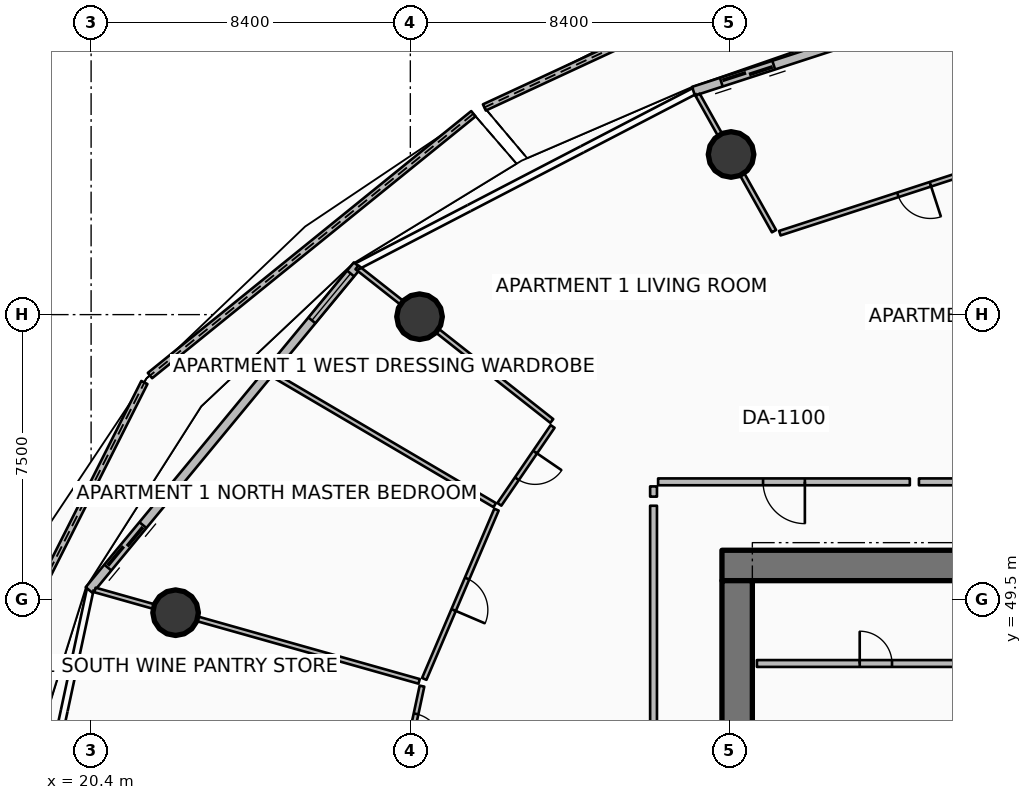
"""IFC4 building model, lengths in metres.
Left out: names, types, materials, properties, quantities, classifications, styles, units other than length and angle.
Written with IfcOpenShell. Run it as: python <this file> out.ifc"""

import sys

from ifc_helpers import new_model, si_unit, direction, frame, frame_2d, origin, origin_2d, place, context, subcontext, project, spatial, polyline, rectangle, circle, outline, extrude, element, fill, save


model = new_model("IFC4")
c1 = context("Model", 3, precision=1e-05, world=origin(), true_north=direction((0.0, 1.0)))
c2 = subcontext(c1, "Body", "Model", "MODEL_VIEW")
j1 = project(units=[si_unit("LENGTHUNIT", "METRE"), si_unit("PLANEANGLEUNIT", "RADIAN")], contexts=[c1])
p1 = place(None, origin())
s1 = spatial("IfcSite", under=j1, at=p1, CompositionType="ELEMENT")
p2 = place(p1, origin())
s2 = spatial("IfcBuilding", under=s1, at=p2, CompositionType="ELEMENT")
p3 = place(p2, frame((0.0, 0.0, 93.9)))
s3 = spatial("IfcBuildingStorey", under=s2, at=p3, CompositionType="ELEMENT", Elevation=93.9)
p4 = place(p3, frame((37.0, 50.4, 0.0), z_axis=(0.0, 0.0, 1.0), x_axis=(1.0, 0.0, 0.0)))
e1 = element("IfcWall", 1, at=p4, inside=s3, PredefinedType="SHEAR", context=c2, shape_type="SweptSolid", body=[
    extrude(rectangle(XDim=9.9, YDim=0.8, at=frame_2d((4.95, 0.0))), origin(), (0.0, 0.0, 1.0), 3.75),
])
p5 = place(p3, frame((37.4, 34.0, 0.0), z_axis=(0.0, 0.0, 1.0), x_axis=(0.0, 1.0, 0.0)))
e2 = element("IfcWall", 2, at=p5, inside=s3, PredefinedType="SHEAR", context=c2, shape_type="SweptSolid", body=[
    extrude(rectangle(XDim=16.0, YDim=0.8, at=frame_2d((8.0, 0.0))), origin(), (0.0, 0.0, 1.0), 3.75),
])
for number, where, z_axis, x_axis in (
    (3, (37.24, 61.214, 0.0), (0.0, 0.0, 1.0), (1.0, 0.0, 0.0)),
    (4, (29.042, 56.945, 0.0), (0.0, 0.0, 1.0), (1.0, 0.0, 0.0)),
    (5, (22.623, 49.157, 0.0), (0.0, 0.0, 1.0), (1.0, 0.0, 0.0)),
):
    element("IfcColumn", number, at=place(p3, frame(where, z_axis=z_axis, x_axis=x_axis)), inside=s3, PredefinedType="COLUMN", context=c2, shape_type="SweptSolid", body=[
        extrude(circle(Radius=0.6, at=origin_2d()), origin(), (0.0, 0.0, 1.0), 3.5),
    ])
p6 = place(p3, frame((39.856, 66.678, 0.0), z_axis=(0.0, 0.0, 1.0), x_axis=(-0.907065674135, -0.420989148086, 0.0)))
e6 = element("IfcWall", 6, at=p6, inside=s3, PredefinedType="PARAPET", context=c2, shape_type="SweptSolid", body=[
    extrude(outline(polyline([(0.0, 0.0), (10.041, 0.0), (10.042, 1.233), (5.021, 1.418), (0.0, 1.632), (0.0, 0.0)])), frame((0.0, 0.09, 0.0), z_axis=(0.0, -1.0, 0.0), x_axis=(1.0, 0.0, 0.0)), (0.0, 0.0, 1.0), 0.18),
])
p7 = place(p3, frame((30.459, 62.285, 0.0), z_axis=(0.0, 0.0, 1.0), x_axis=(-0.777242274281, -0.629201436005, 0.0)))
e7 = element("IfcWall", 7, at=p7, inside=s3, PredefinedType="PARAPET", context=c2, shape_type="SweptSolid", body=[
    extrude(outline(polyline([(0.0, 0.0), (10.949, 0.0), (10.949, 1.148), (5.474, 1.127), (0.0, 1.224), (0.0, 0.0)])), frame((0.0, 0.09, 0.0), z_axis=(0.0, -1.0, 0.0), x_axis=(1.0, 0.0, 0.0)), (0.0, 0.0, 1.0), 0.18),
])
p8 = place(p3, frame((21.802, 55.214, 0.0), z_axis=(0.0, 0.0, 1.0), x_axis=(-0.450016241305, -0.893020370743, 0.0)))
e8 = element("IfcWall", 8, at=p8, inside=s3, PredefinedType="PARAPET", context=c2, shape_type="SweptSolid", body=[
    extrude(outline(polyline([(0.0, 0.0), (11.803, 0.0), (11.803, 1.483), (5.902, 1.284), (0.0, 1.148), (0.0, 0.0)])), frame((0.0, 0.09, 0.0), z_axis=(0.0, -1.0, 0.0), x_axis=(1.0, 0.0, 0.0)), (0.0, 0.0, 1.0), 0.18),
])
p9 = place(p3, frame((45.233, 65.797, 0.0), z_axis=(0.0, 0.0, 1.0), x_axis=(-0.951052494852, -0.30902937083, 0.0)))
e9 = element("IfcWall", 9, at=p9, inside=s3, PredefinedType="SOLIDWALL", context=c2, shape_type="SweptSolid", body=[
    extrude(rectangle(XDim=9.444, YDim=0.24, at=frame_2d((4.722, 0.0))), origin(), (0.0, 0.0, 1.0), 2.45),
])
p10 = place(p9, frame((7.224, 0.0, 0.0)))
e10 = element("IfcOpeningElement", 10, at=p10, cuts=e9, PredefinedType="OPENING", context=c2, shape_type="SweptSolid", body=[
    extrude(rectangle(XDim=1.45, YDim=2.15, at=frame_2d((0.725, 1.075))), frame((0.0, 0.13, 0.0), z_axis=(0.0, -1.0, 0.0), x_axis=(1.0, 0.0, 0.0)), (0.0, 0.0, 1.0), 0.26),
])
p11 = place(p9, frame((0.28, 0.0, 0.65)))
e11 = element("IfcOpeningElement", 11, at=p11, cuts=e9, PredefinedType="OPENING", context=c2, shape_type="SweptSolid", body=[
    extrude(rectangle(XDim=1.6, YDim=1.5, at=frame_2d((0.8, 0.75))), frame((0.0, 0.13, 0.0), z_axis=(0.0, -1.0, 0.0), x_axis=(1.0, 0.0, 0.0)), (0.0, 0.0, 1.0), 0.26),
])
p12 = place(p3, frame((27.407, 58.298, 0.0), z_axis=(0.0, 0.0, 1.0), x_axis=(-0.636704975, -0.771107498868, 0.0)))
e12 = element("IfcWall", 12, at=p12, inside=s3, PredefinedType="SOLIDWALL", context=c2, shape_type="SweptSolid", body=[
    extrude(rectangle(XDim=11.084, YDim=0.24, at=frame_2d((5.542, 0.0))), origin(), (0.0, 0.0, 1.0), 2.45),
])
p13 = place(p12, frame((8.864, 0.0, 0.0)))
e13 = element("IfcOpeningElement", 13, at=p13, cuts=e12, PredefinedType="OPENING", context=c2, shape_type="SweptSolid", body=[
    extrude(rectangle(XDim=1.45, YDim=2.15, at=frame_2d((0.725, 1.075))), frame((0.0, 0.13, 0.0), z_axis=(0.0, -1.0, 0.0), x_axis=(1.0, 0.0, 0.0)), (0.0, 0.0, 1.0), 0.26),
])
p14 = place(p12, frame((0.28, 0.0, 0.65)))
e14 = element("IfcOpeningElement", 14, at=p14, cuts=e12, PredefinedType="OPENING", context=c2, shape_type="SweptSolid", body=[
    extrude(rectangle(XDim=1.6, YDim=1.5, at=frame_2d((0.8, 0.75))), frame((0.0, 0.13, 0.0), z_axis=(0.0, -1.0, 0.0), x_axis=(1.0, 0.0, 0.0)), (0.0, 0.0, 1.0), 0.26),
])
p15 = place(p3, frame((37.92, 47.82, 0.0), z_axis=(0.0, 0.0, 1.0), x_axis=(1.0, 0.0, 0.0)))
e15 = element("IfcWall", 15, at=p15, inside=s3, PredefinedType="PARTITIONING", context=c2, shape_type="SweptSolid", body=[
    extrude(rectangle(XDim=6.26, YDim=0.18, at=frame_2d((3.13, 0.0))), origin(), (0.0, 0.0, 1.0), 3.5),
])
p16 = place(p15, frame((2.705, 0.0, 0.0)))
e16 = element("IfcOpeningElement", 16, at=p16, cuts=e15, PredefinedType="OPENING", context=c2, shape_type="SweptSolid", body=[
    extrude(rectangle(XDim=0.85, YDim=2.06, at=frame_2d((0.425, 1.03))), frame((0.0, 0.1, 0.0), z_axis=(0.0, -1.0, 0.0), x_axis=(1.0, 0.0, 0.0)), (0.0, 0.0, 1.0), 0.2),
])
p17 = place(p3, frame((41.944, 52.6, 0.0), z_axis=(0.0, 0.0, 1.0), x_axis=(-1.0, 0.0, 0.0)))
e17 = element("IfcWall", 17, at=p17, inside=s3, PredefinedType="PARTITIONING", context=c2, shape_type="SweptSolid", body=[
    extrude(rectangle(XDim=6.624, YDim=0.18, at=frame_2d((3.312, 0.0))), origin(), (0.0, 0.0, 1.0), 2.94),
])
p18 = place(p17, frame((2.762, 0.0, 0.0)))
e18 = element("IfcOpeningElement", 18, at=p18, cuts=e17, PredefinedType="OPENING", context=c2, shape_type="SweptSolid", body=[
    extrude(rectangle(XDim=1.1, YDim=2.1, at=frame_2d((0.55, 1.05))), frame((0.0, 0.1, 0.0), z_axis=(0.0, -1.0, 0.0), x_axis=(1.0, 0.0, 0.0)), (0.0, 0.0, 1.0), 0.2),
])
p19 = place(p3, frame((35.2, 52.48, 0.0), z_axis=(0.0, 0.0, 1.0), x_axis=(0.0, -1.0, 0.0)))
e19 = element("IfcWall", 19, at=p19, inside=s3, PredefinedType="PARTITIONING", context=c2, shape_type="SweptSolid", body=[
    extrude(rectangle(XDim=0.269, YDim=0.18, at=frame_2d((0.135, 0.0))), origin(), (0.0, 0.0, 1.0), 2.94),
])
p20 = place(p3, frame((46.625, 52.6, 0.0), z_axis=(0.0, 0.0, 1.0), x_axis=(-1.0, 0.0, 0.0)))
e20 = element("IfcWall", 20, at=p20, inside=s3, PredefinedType="PARTITIONING", context=c2, shape_type="SweptSolid", body=[
    extrude(rectangle(XDim=4.442, YDim=0.18, at=frame_2d((2.221, 0.0))), origin(), (0.0, 0.0, 1.0), 2.94),
])
p21 = place(p3, frame((38.37, 59.196, 0.0), z_axis=(0.0, 0.0, 1.0), x_axis=(-0.488603368932, 0.87250601595, 0.0)))
e21 = element("IfcWall", 21, at=p21, inside=s3, PredefinedType="PARTITIONING", context=c2, shape_type="SweptSolid", body=[
    extrude(rectangle(XDim=4.113, YDim=0.125, at=frame_2d((2.057, 0.0))), origin(), (0.0, 0.0, 1.0), 2.94),
])
p22 = place(p3, frame((45.591, 61.439, 0.0), z_axis=(0.0, 0.0, 1.0), x_axis=(-0.95105434732, -0.309023669714, 0.0)))
e22 = element("IfcWall", 22, at=p22, inside=s3, PredefinedType="PARTITIONING", context=c2, shape_type="SweptSolid", body=[
    extrude(rectangle(XDim=7.431, YDim=0.125, at=frame_2d((3.716, 0.0))), origin(), (0.0, 0.0, 1.0), 2.94),
])
p23 = place(p22, frame((3.265, 0.0, 0.0)))
e23 = element("IfcOpeningElement", 23, at=p23, cuts=e22, PredefinedType="OPENING", context=c2, shape_type="SweptSolid", body=[
    extrude(rectangle(XDim=0.9, YDim=2.08, at=frame_2d((0.45, 1.04))), frame((0.0, 0.073, 0.0), z_axis=(0.0, -1.0, 0.0), x_axis=(1.0, 0.0, 0.0)), (0.0, 0.0, 1.0), 0.145),
])
p24 = place(p3, frame((35.2, 51.971, 0.0), z_axis=(0.0, 0.0, 1.0), x_axis=(0.0, -1.0, 0.0)))
e24 = element("IfcWall", 24, at=p24, inside=s3, PredefinedType="PARTITIONING", context=c2, shape_type="SweptSolid", body=[
    extrude(rectangle(XDim=6.241, YDim=0.18, at=frame_2d((3.12, 0.0))), origin(), (0.0, 0.0, 1.0), 2.94),
])
p25 = place(p3, frame((32.522, 54.202, 0.0), z_axis=(0.0, 0.0, 1.0), x_axis=(-0.785296086335, 0.619120389574, 0.0)))
e25 = element("IfcWall", 25, at=p25, inside=s3, PredefinedType="PARTITIONING", context=c2, shape_type="SweptSolid", body=[
    extrude(rectangle(XDim=6.529, YDim=0.125, at=frame_2d((3.265, 0.0))), origin(), (0.0, 0.0, 1.0), 2.94),
])
p26 = place(p3, frame((31.021, 51.988, 0.0), z_axis=(0.0, 0.0, 1.0), x_axis=(-0.86191844443, 0.507046935846, 0.0)))
e26 = element("IfcWall", 26, at=p26, inside=s3, PredefinedType="PARTITIONING", context=c2, shape_type="SweptSolid", body=[
    extrude(rectangle(XDim=6.765, YDim=0.125, at=frame_2d((3.383, 0.0))), origin(), (0.0, 0.0, 1.0), 2.94),
])
p27 = place(p3, frame((32.544, 54.057, 0.0), z_axis=(0.0, 0.0, 1.0), x_axis=(-0.564377111566, -0.825517096092, 0.0)))
e27 = element("IfcWall", 27, at=p27, inside=s3, PredefinedType="PARTITIONING", context=c2, shape_type="SweptSolid", body=[
    extrude(rectangle(XDim=2.482, YDim=0.125, at=frame_2d((1.241, 0.0))), origin(), (0.0, 0.0, 1.0), 2.94),
])
p28 = place(p27, frame((0.816, 0.0, 0.0)))
e28 = element("IfcOpeningElement", 28, at=p28, cuts=e27, PredefinedType="OPENING", context=c2, shape_type="SweptSolid", body=[
    extrude(rectangle(XDim=0.85, YDim=2.06, at=frame_2d((0.425, 1.03))), frame((0.0, 0.073, 0.0), z_axis=(0.0, -1.0, 0.0), x_axis=(1.0, 0.0, 0.0)), (0.0, 0.0, 1.0), 0.145),
])
p29 = place(p3, frame((31.067, 51.868, 0.0), z_axis=(0.0, 0.0, 1.0), x_axis=(-0.392470533914, -0.919764578579, 0.0)))
e29 = element("IfcWall", 29, at=p29, inside=s3, PredefinedType="PARTITIONING", context=c2, shape_type="SweptSolid", body=[
    extrude(rectangle(XDim=4.842, YDim=0.125, at=frame_2d((2.421, 0.0))), origin(), (0.0, 0.0, 1.0), 2.94),
])
p30 = place(p29, frame((1.971, 0.0, 0.0)))
e30 = element("IfcOpeningElement", 30, at=p30, cuts=e29, PredefinedType="OPENING", context=c2, shape_type="SweptSolid", body=[
    extrude(rectangle(XDim=0.9, YDim=2.08, at=frame_2d((0.45, 1.04))), frame((0.0, 0.073, 0.0), z_axis=(0.0, -1.0, 0.0), x_axis=(1.0, 0.0, 0.0)), (0.0, 0.0, 1.0), 0.145),
])
p31 = place(p3, frame((29.031, 47.35, 0.0), z_axis=(0.0, 0.0, 1.0), x_axis=(-0.962455027906, 0.271441189317, 0.0)))
e31 = element("IfcWall", 31, at=p31, inside=s3, PredefinedType="PARTITIONING", context=c2, shape_type="SweptSolid", body=[
    extrude(rectangle(XDim=8.862, YDim=0.125, at=frame_2d((4.431, 0.0))), origin(), (0.0, 0.0, 1.0), 2.94),
])
p32 = place(p3, frame((29.106, 47.225, 0.0), z_axis=(0.0, 0.0, 1.0), x_axis=(-0.208839045871, -0.977950025778, 0.0)))
e32 = element("IfcWall", 32, at=p32, inside=s3, PredefinedType="PARTITIONING", context=c2, shape_type="SweptSolid", body=[
    extrude(rectangle(XDim=2.344, YDim=0.125, at=frame_2d((1.172, 0.0))), origin(), (0.0, 0.0, 1.0), 2.94),
])
p33 = place(p32, frame((0.747, 0.0, 0.0)))
e33 = element("IfcOpeningElement", 33, at=p33, cuts=e32, PredefinedType="OPENING", context=c2, shape_type="SweptSolid", body=[
    extrude(rectangle(XDim=0.85, YDim=2.06, at=frame_2d((0.425, 1.03))), frame((0.0, 0.073, 0.0), z_axis=(0.0, -1.0, 0.0), x_axis=(1.0, 0.0, 0.0)), (0.0, 0.0, 1.0), 0.145),
])
p34 = place(p10, origin())
e34 = element("IfcDoor", 34, at=p34, inside=s3, OperationType="DOUBLE_DOOR_SLIDING", PredefinedType="DOOR", context=c2, shape_type="SweptSolid", body=[
    extrude(rectangle(XDim=1.45, YDim=2.15, at=frame_2d((0.725, 1.075))), frame((0.0, 0.025, 0.0), z_axis=(0.0, -1.0, 0.0), x_axis=(1.0, 0.0, 0.0)), (0.0, 0.0, 1.0), 0.05),
])
fill(e10, e34)
p35 = place(p13, origin())
e35 = element("IfcDoor", 35, at=p35, inside=s3, OperationType="DOUBLE_DOOR_SLIDING", PredefinedType="DOOR", context=c2, shape_type="SweptSolid", body=[
    extrude(rectangle(XDim=1.45, YDim=2.15, at=frame_2d((0.725, 1.075))), frame((0.0, 0.025, 0.0), z_axis=(0.0, -1.0, 0.0), x_axis=(1.0, 0.0, 0.0)), (0.0, 0.0, 1.0), 0.05),
])
fill(e13, e35)
p36 = place(p14, origin())
e36 = element("IfcWindow", 36, at=p36, inside=s3, PartitioningType="SINGLE_PANEL", PredefinedType="WINDOW", context=c2, shape_type="SweptSolid", body=[
    extrude(rectangle(XDim=1.6, YDim=1.5, at=frame_2d((0.8, 0.75))), frame((0.0, 0.03, 0.0), z_axis=(0.0, -1.0, 0.0), x_axis=(1.0, 0.0, 0.0)), (0.0, 0.0, 1.0), 0.06),
])
fill(e14, e36)
p37 = place(p16, origin())
e37 = element("IfcDoor", 37, at=p37, inside=s3, OperationType="SINGLE_SWING_LEFT", PredefinedType="DOOR", context=c2, shape_type="SweptSolid", body=[
    extrude(rectangle(XDim=0.85, YDim=2.06, at=frame_2d((0.425, 1.03))), frame((0.0, 0.025, 0.0), z_axis=(0.0, -1.0, 0.0), x_axis=(1.0, 0.0, 0.0)), (0.0, 0.0, 1.0), 0.05),
])
fill(e16, e37)
p38 = place(p18, origin())
e38 = element("IfcDoor", 38, at=p38, inside=s3, OperationType="SINGLE_SWING_LEFT", PredefinedType="DOOR", context=c2, shape_type="SweptSolid", body=[
    extrude(rectangle(XDim=1.1, YDim=2.1, at=frame_2d((0.55, 1.05))), frame((0.0, 0.025, 0.0), z_axis=(0.0, -1.0, 0.0), x_axis=(1.0, 0.0, 0.0)), (0.0, 0.0, 1.0), 0.05),
])
fill(e18, e38)
p39 = place(p23, origin())
e39 = element("IfcDoor", 39, at=p39, inside=s3, OperationType="SINGLE_SWING_LEFT", PredefinedType="DOOR", context=c2, shape_type="SweptSolid", body=[
    extrude(rectangle(XDim=0.9, YDim=2.08, at=frame_2d((0.45, 1.04))), frame((0.0, 0.025, 0.0), z_axis=(0.0, -1.0, 0.0), x_axis=(1.0, 0.0, 0.0)), (0.0, 0.0, 1.0), 0.05),
])
fill(e23, e39)
p40 = place(p28, origin())
e40 = element("IfcDoor", 40, at=p40, inside=s3, OperationType="SINGLE_SWING_LEFT", PredefinedType="DOOR", context=c2, shape_type="SweptSolid", body=[
    extrude(rectangle(XDim=0.85, YDim=2.06, at=frame_2d((0.425, 1.03))), frame((0.0, 0.025, 0.0), z_axis=(0.0, -1.0, 0.0), x_axis=(1.0, 0.0, 0.0)), (0.0, 0.0, 1.0), 0.05),
])
fill(e28, e40)
p41 = place(p30, origin())
e41 = element("IfcDoor", 41, at=p41, inside=s3, OperationType="SINGLE_SWING_RIGHT", PredefinedType="DOOR", context=c2, shape_type="SweptSolid", body=[
    extrude(rectangle(XDim=0.9, YDim=2.08, at=frame_2d((0.45, 1.04))), frame((0.0, 0.025, 0.0), z_axis=(0.0, -1.0, 0.0), x_axis=(1.0, 0.0, 0.0)), (0.0, 0.0, 1.0), 0.05),
])
fill(e30, e41)
p42 = place(p33, origin())
e42 = element("IfcDoor", 42, at=p42, inside=s3, OperationType="SINGLE_SWING_RIGHT", PredefinedType="DOOR", context=c2, shape_type="SweptSolid", body=[
    extrude(rectangle(XDim=0.85, YDim=2.06, at=frame_2d((0.425, 1.03))), frame((0.0, 0.025, 0.0), z_axis=(0.0, -1.0, 0.0), x_axis=(1.0, 0.0, 0.0)), (0.0, 0.0, 1.0), 0.05),
])
fill(e33, e42)
save(model, sys.argv[1])
